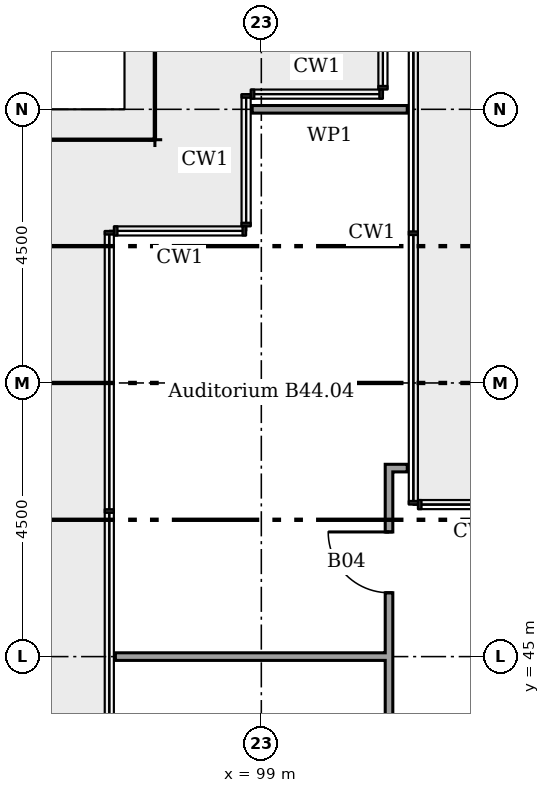
"""IFC4 building model, lengths in metres.
Left out: names, types, materials, properties, quantities, classifications, styles, units other than length and angle.
Written with IfcOpenShell. Run it as: python <this file> out.ifc"""

import sys

from ifc_helpers import new_model, si_unit, direction, frame, frame_2d, origin, place, context, subcontext, project, spatial, rectangle, extrude, element, fill, save


model = new_model("IFC4")
c1 = context("Model", 3, precision=1e-05, world=origin(), true_north=direction((0.0, 1.0)))
c2 = subcontext(c1, "Body", "Model", "MODEL_VIEW")
j1 = project(units=[si_unit("LENGTHUNIT", "METRE"), si_unit("PLANEANGLEUNIT", "RADIAN")], contexts=[c1])
p1 = place(None, origin())
s1 = spatial("IfcSite", under=j1, at=p1, CompositionType="ELEMENT")
p2 = place(p1, origin())
s2 = spatial("IfcBuilding", under=s1, at=p2, CompositionType="ELEMENT")
p3 = place(p2, frame((0.0, 0.0, 176.2)))
s3 = spatial("IfcBuildingStorey", under=s2, at=p3, CompositionType="ELEMENT", Elevation=176.2)
p4 = place(p3, frame((96.6, 45.0, 0.0)))
e1 = element("IfcWall", 1, at=p4, inside=s3, PredefinedType="PARTITIONING", context=c2, shape_type="SweptSolid", body=[
    extrude(rectangle(XDim=4.5, YDim=0.125, at=frame_2d((2.25, 0.0))), origin(), (0.0, 0.0, 1.0), 2.851),
])
p5 = place(p3, frame((101.038, 48.1, 0.0)))
e2 = element("IfcWall", 2, at=p5, inside=s3, PredefinedType="PARTITIONING", context=c2, shape_type="SweptSolid", body=[
    extrude(rectangle(XDim=0.362, YDim=0.125, at=frame_2d((0.181, 0.0))), origin(), (0.0, 0.0, 1.0), 3.45),
])
p6 = place(p3, frame((98.85, 54.0, 0.0)))
e3 = element("IfcWall", 3, at=p6, inside=s3, PredefinedType="PARTITIONING", context=c2, shape_type="SweptSolid", body=[
    extrude(rectangle(XDim=2.55, YDim=0.125, at=frame_2d((1.275, 0.0))), origin(), (0.0, 0.0, 1.0), 2.921),
])
p7 = place(p3, frame((101.1, 33.663, 0.0), z_axis=(0.0, 0.0, 1.0), x_axis=(0.0, 1.0, 0.0)))
e4 = element("IfcWall", 4, at=p7, inside=s3, PredefinedType="PARTITIONING", context=c2, shape_type="SweptSolid", body=[
    extrude(rectangle(XDim=14.375, YDim=0.125, at=frame_2d((7.188, 0.0))), origin(), (0.0, 0.0, 1.0), 3.45),
])
p8 = place(p7, frame((4.087, 0.0, 0.0)))
e5 = element("IfcOpeningElement", 5, at=p8, cuts=e4, PredefinedType="OPENING", context=c2, shape_type="SweptSolid", body=[
    extrude(rectangle(XDim=1.0, YDim=2.1, at=frame_2d((0.5, 1.05))), frame((0.0, 0.073, 0.0), z_axis=(0.0, -1.0, 0.0), x_axis=(1.0, 0.0, 0.0)), (0.0, 0.0, 1.0), 0.145),
])
p9 = place(p7, frame((12.387, 0.0, 0.0)))
e6 = element("IfcOpeningElement", 6, at=p9, cuts=e4, PredefinedType="OPENING", context=c2, shape_type="SweptSolid", body=[
    extrude(rectangle(XDim=1.0, YDim=2.1, at=frame_2d((0.5, 1.05))), frame((0.0, 0.073, 0.0), z_axis=(0.0, -1.0, 0.0), x_axis=(1.0, 0.0, 0.0)), (0.0, 0.0, 1.0), 0.145),
])
p10 = place(p7, frame((8.133, 0.0, 0.0)))
e7 = element("IfcOpeningElement", 7, at=p10, cuts=e4, PredefinedType="OPENING", context=c2, shape_type="SweptSolid", body=[
    extrude(rectangle(XDim=1.0, YDim=2.1, at=frame_2d((0.5, 1.05))), frame((0.0, 0.073, 0.0), z_axis=(0.0, -1.0, 0.0), x_axis=(1.0, 0.0, 0.0)), (0.0, 0.0, 1.0), 0.145),
])
p11 = place(p9, origin())
e8 = element("IfcDoor", 8, at=p11, inside=s3, OperationType="SINGLE_SWING_LEFT", PredefinedType="DOOR", context=c2, shape_type="SweptSolid", body=[
    extrude(rectangle(XDim=1.0, YDim=2.1, at=frame_2d((0.5, 1.05))), frame((0.0, 0.025, 0.0), z_axis=(0.0, -1.0, 0.0), x_axis=(1.0, 0.0, 0.0)), (0.0, 0.0, 1.0), 0.05),
])
fill(e6, e8)
save(model, sys.argv[1])
